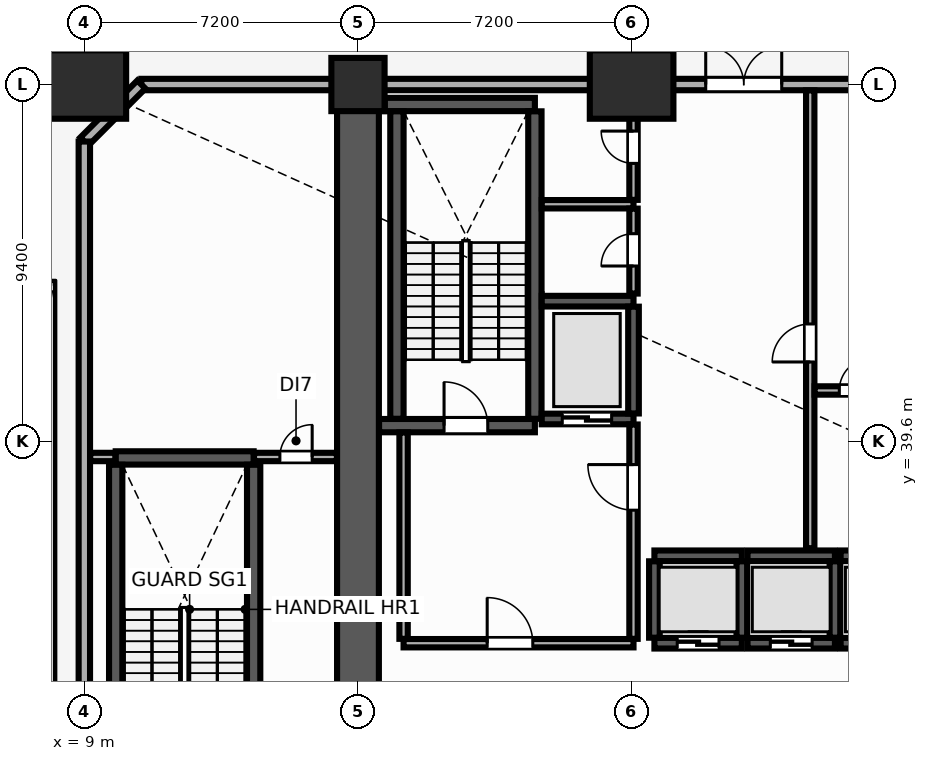
"""IFC4 building model, lengths in metres.
Left out: names, types, materials, properties, quantities, classifications, styles, units other than length and angle.
Written with IfcOpenShell. Run it as: python <this file> out.ifc"""

import sys

from ifc_helpers import new_model, si_unit, direction, frame, frame_2d, origin, origin_2d, place, context, subcontext, project, spatial, rectangle, extrude, element, fill, save


model = new_model("IFC4")
c1 = context("Model", 3, precision=1e-05, world=origin(), true_north=direction((0.0, 1.0)))
c2 = subcontext(c1, "Body", "Model", "MODEL_VIEW")
j1 = project(units=[si_unit("LENGTHUNIT", "METRE"), si_unit("PLANEANGLEUNIT", "RADIAN")], contexts=[c1])
p1 = place(None, origin())
s1 = spatial("IfcSite", under=j1, at=p1, CompositionType="ELEMENT")
p2 = place(p1, origin())
s2 = spatial("IfcBuilding", under=s1, at=p2, CompositionType="ELEMENT")
p3 = place(p2, origin())
s3 = spatial("IfcBuildingStorey", under=s2, at=p3, CompositionType="ELEMENT", Elevation=0.0)
for number, where, z_axis, x_axis in (
    (1, (9.0, 49.0, 0.0), (0.0, 0.0, 1.0), (1.0, 0.0, 0.0)),
    (2, (23.4, 49.0, 0.0), (0.0, 0.0, 1.0), (1.0, 0.0, 0.0)),
):
    element("IfcColumn", number, at=place(p3, frame(where, z_axis=z_axis, x_axis=x_axis)), inside=s3, PredefinedType="USERDEFINED", context=c2, shape_type="SweptSolid", body=[
        extrude(rectangle(XDim=2.2, YDim=1.8, at=origin_2d()), origin(), (0.0, 0.0, 1.0), 7.68),
    ])
p4 = place(p3, frame((16.2, 49.0, 0.0), z_axis=(0.0, 0.0, 1.0), x_axis=(1.0, 0.0, 0.0)))
e3 = element("IfcColumn", 3, at=p4, inside=s3, PredefinedType="COLUMN", context=c2, shape_type="SweptSolid", body=[
    extrude(rectangle(XDim=1.4, YDim=1.4, at=origin_2d()), origin(), (0.0, 0.0, 1.0), 7.68),
])
p5 = place(p3, frame((73.5, 49.0, 0.0), z_axis=(0.0, 0.0, 1.0), x_axis=(-1.0, 0.0, 0.0)))
e4 = element("IfcWall", 4, at=p5, inside=s3, PredefinedType="SOLIDWALL", context=c2, shape_type="SweptSolid", body=[
    extrude(rectangle(XDim=63.0, YDim=0.3, at=frame_2d((31.5, 0.0))), origin(), (0.0, 0.0, 1.0), 5.4),
])
p6 = place(p5, frame((46.15, 0.0, 0.0)))
e5 = element("IfcOpeningElement", 5, at=p6, cuts=e4, PredefinedType="OPENING", context=c2, shape_type="SweptSolid", body=[
    extrude(rectangle(XDim=2.0, YDim=2.4, at=frame_2d((1.0, 1.2))), frame((0.0, 0.16, 0.0), z_axis=(0.0, -1.0, 0.0), x_axis=(1.0, 0.0, 0.0)), (0.0, 0.0, 1.0), 0.32),
])
p7 = place(p5, frame((37.6, 0.0, 0.0)))
e6 = element("IfcOpeningElement", 6, at=p7, cuts=e4, PredefinedType="OPENING", context=c2, shape_type="SweptSolid", body=[
    extrude(rectangle(XDim=2.0, YDim=2.4, at=frame_2d((1.0, 1.2))), frame((0.0, 0.16, 0.0), z_axis=(0.0, -1.0, 0.0), x_axis=(1.0, 0.0, 0.0)), (0.0, 0.0, 1.0), 0.32),
])
p8 = place(p5, frame((16.65, 0.0, 0.0)))
e7 = element("IfcOpeningElement", 7, at=p8, cuts=e4, PredefinedType="OPENING", context=c2, shape_type="SweptSolid", body=[
    extrude(rectangle(XDim=2.0, YDim=2.4, at=frame_2d((1.0, 1.2))), frame((0.0, 0.16, 0.0), z_axis=(0.0, -1.0, 0.0), x_axis=(1.0, 0.0, 0.0)), (0.0, 0.0, 1.0), 0.32),
])
p9 = place(p3, frame((10.5, 49.0, 0.0), z_axis=(0.0, 0.0, 1.0), x_axis=(-0.707106781187, -0.707106781187, 0.0)))
e8 = element("IfcWall", 8, at=p9, inside=s3, PredefinedType="SOLIDWALL", context=c2, shape_type="SweptSolid", body=[
    extrude(rectangle(XDim=2.121, YDim=0.3, at=frame_2d((1.061, 0.0))), origin(), (0.0, 0.0, 1.0), 7.68),
])
p10 = place(p3, frame((9.0, 47.5, 0.0), z_axis=(0.0, 0.0, 1.0), x_axis=(0.0, -1.0, 0.0)))
e9 = element("IfcWall", 9, at=p10, inside=s3, PredefinedType="SOLIDWALL", context=c2, shape_type="SweptSolid", body=[
    extrude(rectangle(XDim=26.8, YDim=0.3, at=frame_2d((13.4, 0.0))), origin(), (0.0, 0.0, 1.0), 5.4),
])
p11 = place(p3, frame((16.2, 29.4, 0.0), z_axis=(0.0, 0.0, 1.0), x_axis=(0.0, 1.0, 0.0)))
e10 = element("IfcWall", 10, at=p11, inside=s3, PredefinedType="SHEAR", context=c2, shape_type="SweptSolid", body=[
    extrude(rectangle(XDim=19.2, YDim=1.1, at=frame_2d((9.6, 0.0))), origin(), (0.0, 0.0, 1.0), 7.68),
])
p12 = place(p3, frame((16.755, 40.025, 0.0), z_axis=(0.0, 0.0, 1.0), x_axis=(1.0, 0.0, 0.0)))
e11 = element("IfcWall", 11, at=p12, inside=s3, PredefinedType="SHEAR", context=c2, shape_type="SweptSolid", body=[
    extrude(rectangle(XDim=4.1, YDim=0.35, at=frame_2d((2.05, 0.0))), origin(), (0.0, 0.0, 1.0), 7.68),
])
p13 = place(p12, frame((1.71, 0.0, 0.0)))
e12 = element("IfcOpeningElement", 12, at=p13, cuts=e11, PredefinedType="OPENING", context=c2, shape_type="SweptSolid", body=[
    extrude(rectangle(XDim=1.15, YDim=2.15, at=frame_2d((0.575, 1.075))), frame((0.0, 0.185, 0.0), z_axis=(0.0, -1.0, 0.0), x_axis=(1.0, 0.0, 0.0)), (0.0, 0.0, 1.0), 0.37),
])
p14 = place(p3, frame((16.905, 48.475, 0.0), z_axis=(0.0, 0.0, 1.0), x_axis=(1.0, 0.0, 0.0)))
e13 = element("IfcWall", 13, at=p14, inside=s3, PredefinedType="SHEAR", context=c2, shape_type="SweptSolid", body=[
    extrude(rectangle(XDim=3.95, YDim=0.35, at=frame_2d((1.975, 0.0))), origin(), (0.0, 0.0, 1.0), 7.68),
])
for number, where, z_axis, x_axis in (
    (14, (17.225, 40.205, 0.0), (0.0, 0.0, 1.0), (0.0, 1.0, 0.0)),
    (15, (20.855, 40.205, 0.0), (0.0, 0.0, 1.0), (0.0, 1.0, 0.0)),
):
    element("IfcWall", number, at=place(p3, frame(where, z_axis=z_axis, x_axis=x_axis)), inside=s3, PredefinedType="SHEAR", context=c2, shape_type="SweptSolid", body=[
        extrude(rectangle(XDim=8.09, YDim=0.35, at=frame_2d((4.045, 0.0))), origin(), (0.0, 0.0, 1.0), 7.68),
    ])
p15 = place(p3, frame((9.825, 39.175, 0.0), z_axis=(0.0, 0.0, 1.0), x_axis=(1.0, 0.0, 0.0)))
e16 = element("IfcWall", 16, at=p15, inside=s3, PredefinedType="SHEAR", context=c2, shape_type="SweptSolid", body=[
    extrude(rectangle(XDim=3.63, YDim=0.35, at=frame_2d((1.815, 0.0))), origin(), (0.0, 0.0, 1.0), 7.68),
])
for number, where, z_axis, x_axis in (
    (17, (9.825, 30.555, 0.0), (0.0, 0.0, 1.0), (0.0, 1.0, 0.0)),
    (18, (13.455, 30.555, 0.0), (0.0, 0.0, 1.0), (0.0, 1.0, 0.0)),
):
    element("IfcWall", number, at=place(p3, frame(where, z_axis=z_axis, x_axis=x_axis)), inside=s3, PredefinedType="SHEAR", context=c2, shape_type="SweptSolid", body=[
        extrude(rectangle(XDim=8.44, YDim=0.35, at=frame_2d((4.22, 0.0))), origin(), (0.0, 0.0, 1.0), 7.68),
    ])
p16 = place(p3, frame((24.0, 34.3, 0.0), z_axis=(0.0, 0.0, 1.0), x_axis=(1.0, 0.0, 0.0)))
e19 = element("IfcWall", 19, at=p16, inside=s3, PredefinedType="SHEAR", context=c2, shape_type="SweptSolid", body=[
    extrude(rectangle(XDim=2.3, YDim=0.28, at=frame_2d((1.15, 0.0))), origin(), (0.0, 0.0, 1.0), 7.68),
])
p17 = place(p16, frame((0.6, 0.0, 0.0)))
e20 = element("IfcOpeningElement", 20, at=p17, cuts=e19, PredefinedType="OPENING", context=c2, shape_type="SweptSolid", body=[
    extrude(rectangle(XDim=1.1, YDim=2.2, at=frame_2d((0.55, 1.1))), frame((0.0, 0.15, 0.0), z_axis=(0.0, -1.0, 0.0), x_axis=(1.0, 0.0, 0.0)), (0.0, 0.0, 1.0), 0.3),
])
p18 = place(p3, frame((24.0, 36.6, 0.0), z_axis=(0.0, 0.0, 1.0), x_axis=(1.0, 0.0, 0.0)))
e21 = element("IfcWall", 21, at=p18, inside=s3, PredefinedType="SHEAR", context=c2, shape_type="SweptSolid", body=[
    extrude(rectangle(XDim=2.3, YDim=0.28, at=frame_2d((1.15, 0.0))), origin(), (0.0, 0.0, 1.0), 7.68),
])
for number, where, z_axis, x_axis in (
    (22, (24.0, 34.445, 0.0), (0.0, 0.0, 1.0), (0.0, 1.0, 0.0)),
    (23, (26.3, 34.445, 0.0), (0.0, 0.0, 1.0), (0.0, 1.0, 0.0)),
):
    element("IfcWall", number, at=place(p3, frame(where, z_axis=z_axis, x_axis=x_axis)), inside=s3, PredefinedType="SHEAR", context=c2, shape_type="SweptSolid", body=[
        extrude(rectangle(XDim=2.01, YDim=0.28, at=frame_2d((1.005, 0.0))), origin(), (0.0, 0.0, 1.0), 7.68),
    ])
p19 = place(p3, frame((26.45, 34.3, 0.0), z_axis=(0.0, 0.0, 1.0), x_axis=(1.0, 0.0, 0.0)))
e24 = element("IfcWall", 24, at=p19, inside=s3, PredefinedType="SHEAR", context=c2, shape_type="SweptSolid", body=[
    extrude(rectangle(XDim=2.3, YDim=0.28, at=frame_2d((1.15, 0.0))), origin(), (0.0, 0.0, 1.0), 7.68),
])
p20 = place(p19, frame((0.6, 0.0, 0.0)))
e25 = element("IfcOpeningElement", 25, at=p20, cuts=e24, PredefinedType="OPENING", context=c2, shape_type="SweptSolid", body=[
    extrude(rectangle(XDim=1.1, YDim=2.2, at=frame_2d((0.55, 1.1))), frame((0.0, 0.15, 0.0), z_axis=(0.0, -1.0, 0.0), x_axis=(1.0, 0.0, 0.0)), (0.0, 0.0, 1.0), 0.3),
])
p21 = place(p3, frame((26.45, 36.6, 0.0), z_axis=(0.0, 0.0, 1.0), x_axis=(1.0, 0.0, 0.0)))
e26 = element("IfcWall", 26, at=p21, inside=s3, PredefinedType="SHEAR", context=c2, shape_type="SweptSolid", body=[
    extrude(rectangle(XDim=2.3, YDim=0.28, at=frame_2d((1.15, 0.0))), origin(), (0.0, 0.0, 1.0), 7.68),
])
p22 = place(p3, frame((28.75, 34.445, 0.0), z_axis=(0.0, 0.0, 1.0), x_axis=(0.0, 1.0, 0.0)))
e27 = element("IfcWall", 27, at=p22, inside=s3, PredefinedType="SHEAR", context=c2, shape_type="SweptSolid", body=[
    extrude(rectangle(XDim=2.01, YDim=0.28, at=frame_2d((1.005, 0.0))), origin(), (0.0, 0.0, 1.0), 7.68),
])
p23 = place(p3, frame((28.9, 34.3, 0.0), z_axis=(0.0, 0.0, 1.0), x_axis=(1.0, 0.0, 0.0)))
e28 = element("IfcWall", 28, at=p23, inside=s3, PredefinedType="SHEAR", context=c2, shape_type="SweptSolid", body=[
    extrude(rectangle(XDim=2.3, YDim=0.28, at=frame_2d((1.15, 0.0))), origin(), (0.0, 0.0, 1.0), 7.68),
])
p24 = place(p23, frame((0.6, 0.0, 0.0)))
e29 = element("IfcOpeningElement", 29, at=p24, cuts=e28, PredefinedType="OPENING", context=c2, shape_type="SweptSolid", body=[
    extrude(rectangle(XDim=1.1, YDim=2.2, at=frame_2d((0.55, 1.1))), frame((0.0, 0.15, 0.0), z_axis=(0.0, -1.0, 0.0), x_axis=(1.0, 0.0, 0.0)), (0.0, 0.0, 1.0), 0.3),
])
p25 = place(p3, frame((28.9, 36.6, 0.0), z_axis=(0.0, 0.0, 1.0), x_axis=(1.0, 0.0, 0.0)))
e30 = element("IfcWall", 30, at=p25, inside=s3, PredefinedType="SHEAR", context=c2, shape_type="SweptSolid", body=[
    extrude(rectangle(XDim=2.3, YDim=0.28, at=frame_2d((1.15, 0.0))), origin(), (0.0, 0.0, 1.0), 7.68),
])
p26 = place(p3, frame((21.035, 40.2, 0.0), z_axis=(0.0, 0.0, 1.0), x_axis=(1.0, 0.0, 0.0)))
e31 = element("IfcWall", 31, at=p26, inside=s3, PredefinedType="SHEAR", context=c2, shape_type="SweptSolid", body=[
    extrude(rectangle(XDim=2.415, YDim=0.28, at=frame_2d((1.208, 0.0))), origin(), (0.0, 0.0, 1.0), 7.68),
])
p27 = place(p26, frame((0.54, 0.0, 0.0)))
e32 = element("IfcOpeningElement", 32, at=p27, cuts=e31, PredefinedType="OPENING", context=c2, shape_type="SweptSolid", body=[
    extrude(rectangle(XDim=1.3, YDim=2.3, at=frame_2d((0.65, 1.15))), frame((0.0, 0.15, 0.0), z_axis=(0.0, -1.0, 0.0), x_axis=(1.0, 0.0, 0.0)), (0.0, 0.0, 1.0), 0.3),
])
p28 = place(p3, frame((21.035, 43.3, 0.0), z_axis=(0.0, 0.0, 1.0), x_axis=(1.0, 0.0, 0.0)))
e33 = element("IfcWall", 33, at=p28, inside=s3, PredefinedType="SHEAR", context=c2, shape_type="SweptSolid", body=[
    extrude(rectangle(XDim=2.415, YDim=0.28, at=frame_2d((1.208, 0.0))), origin(), (0.0, 0.0, 1.0), 7.68),
])
p29 = place(p3, frame((23.45, 40.345, 0.0), z_axis=(0.0, 0.0, 1.0), x_axis=(0.0, 1.0, 0.0)))
e34 = element("IfcWall", 34, at=p29, inside=s3, PredefinedType="SHEAR", context=c2, shape_type="SweptSolid", body=[
    extrude(rectangle(XDim=2.81, YDim=0.28, at=frame_2d((1.405, 0.0))), origin(), (0.0, 0.0, 1.0), 7.68),
])
p30 = place(p3, frame((17.4, 34.3, 0.0), z_axis=(0.0, 0.0, 1.0), x_axis=(1.0, 0.0, 0.0)))
e35 = element("IfcWall", 35, at=p30, inside=s3, PredefinedType="PARTITIONING", context=c2, shape_type="SweptSolid", body=[
    extrude(rectangle(XDim=6.05, YDim=0.22, at=frame_2d((3.025, 0.0))), origin(), (0.0, 0.0, 1.0), 7.68),
])
p31 = place(p30, frame((2.2, 0.0, 0.0)))
e36 = element("IfcOpeningElement", 36, at=p31, cuts=e35, PredefinedType="OPENING", context=c2, shape_type="SweptSolid", body=[
    extrude(rectangle(XDim=1.2, YDim=2.15, at=frame_2d((0.6, 1.075))), frame((0.0, 0.12, 0.0), z_axis=(0.0, -1.0, 0.0), x_axis=(1.0, 0.0, 0.0)), (0.0, 0.0, 1.0), 0.24),
])
p32 = place(p3, frame((17.4, 34.415, 0.0), z_axis=(0.0, 0.0, 1.0), x_axis=(0.0, 1.0, 0.0)))
e37 = element("IfcWall", 37, at=p32, inside=s3, PredefinedType="PARTITIONING", context=c2, shape_type="SweptSolid", body=[
    extrude(rectangle(XDim=5.43, YDim=0.22, at=frame_2d((2.715, 0.0))), origin(), (0.0, 0.0, 1.0), 7.68),
])
p33 = place(p3, frame((23.45, 34.415, 0.0), z_axis=(0.0, 0.0, 1.0), x_axis=(0.0, 1.0, 0.0)))
e38 = element("IfcWall", 38, at=p33, inside=s3, PredefinedType="PARTITIONING", context=c2, shape_type="SweptSolid", body=[
    extrude(rectangle(XDim=5.64, YDim=0.22, at=frame_2d((2.82, 0.0))), origin(), (0.0, 0.0, 1.0), 7.68),
])
p34 = place(p33, frame((3.385, 0.0, 0.0)))
e39 = element("IfcOpeningElement", 39, at=p34, cuts=e38, PredefinedType="OPENING", context=c2, shape_type="SweptSolid", body=[
    extrude(rectangle(XDim=1.2, YDim=2.15, at=frame_2d((0.6, 1.075))), frame((0.0, 0.12, 0.0), z_axis=(0.0, -1.0, 0.0), x_axis=(1.0, 0.0, 0.0)), (0.0, 0.0, 1.0), 0.24),
])
p35 = place(p3, frame((21.035, 45.85, 0.0), z_axis=(0.0, 0.0, 1.0), x_axis=(1.0, 0.0, 0.0)))
e40 = element("IfcWall", 40, at=p35, inside=s3, PredefinedType="PARTITIONING", context=c2, shape_type="SweptSolid", body=[
    extrude(rectangle(XDim=2.415, YDim=0.22, at=frame_2d((1.208, 0.0))), origin(), (0.0, 0.0, 1.0), 7.68),
])
p36 = place(p3, frame((23.45, 43.5, 0.0), z_axis=(0.0, 0.0, 1.0), x_axis=(0.0, 1.0, 0.0)))
e41 = element("IfcWall", 41, at=p36, inside=s3, PredefinedType="PARTITIONING", context=c2, shape_type="SweptSolid", body=[
    extrude(rectangle(XDim=2.235, YDim=0.22, at=frame_2d((1.118, 0.0))), origin(), (0.0, 0.0, 1.0), 7.68),
])
p37 = place(p36, frame((0.725, 0.0, 0.0)))
e42 = element("IfcOpeningElement", 42, at=p37, cuts=e41, PredefinedType="OPENING", context=c2, shape_type="SweptSolid", body=[
    extrude(rectangle(XDim=0.85, YDim=2.1, at=frame_2d((0.425, 1.05))), frame((0.0, 0.12, 0.0), z_axis=(0.0, -1.0, 0.0), x_axis=(1.0, 0.0, 0.0)), (0.0, 0.0, 1.0), 0.24),
])
p38 = place(p3, frame((23.45, 45.965, 0.0), z_axis=(0.0, 0.0, 1.0), x_axis=(0.0, 1.0, 0.0)))
e43 = element("IfcWall", 43, at=p38, inside=s3, PredefinedType="PARTITIONING", context=c2, shape_type="SweptSolid", body=[
    extrude(rectangle(XDim=2.88, YDim=0.22, at=frame_2d((1.44, 0.0))), origin(), (0.0, 0.0, 1.0), 7.68),
])
p39 = place(p38, frame((0.96, 0.0, 0.0)))
e44 = element("IfcOpeningElement", 44, at=p39, cuts=e43, PredefinedType="OPENING", context=c2, shape_type="SweptSolid", body=[
    extrude(rectangle(XDim=0.85, YDim=2.1, at=frame_2d((0.425, 1.05))), frame((0.0, 0.12, 0.0), z_axis=(0.0, -1.0, 0.0), x_axis=(1.0, 0.0, 0.0)), (0.0, 0.0, 1.0), 0.24),
])
p40 = place(p3, frame((28.1, 36.8, 0.0), z_axis=(0.0, 0.0, 1.0), x_axis=(0.0, 1.0, 0.0)))
e45 = element("IfcWall", 45, at=p40, inside=s3, PredefinedType="PARTITIONING", context=c2, shape_type="SweptSolid", body=[
    extrude(rectangle(XDim=12.045, YDim=0.22, at=frame_2d((6.022, 0.0))), origin(), (0.0, 0.0, 1.0), 7.68),
])
p41 = place(p40, frame((4.9, 0.0, 0.0)))
e46 = element("IfcOpeningElement", 46, at=p41, cuts=e45, PredefinedType="OPENING", context=c2, shape_type="SweptSolid", body=[
    extrude(rectangle(XDim=1.0, YDim=2.15, at=frame_2d((0.5, 1.075))), frame((0.0, 0.12, 0.0), z_axis=(0.0, -1.0, 0.0), x_axis=(1.0, 0.0, 0.0)), (0.0, 0.0, 1.0), 0.24),
])
p42 = place(p3, frame((28.215, 40.95, 0.0), z_axis=(0.0, 0.0, 1.0), x_axis=(1.0, 0.0, 0.0)))
e47 = element("IfcWall", 47, at=p42, inside=s3, PredefinedType="PARTITIONING", context=c2, shape_type="SweptSolid", body=[
    extrude(rectangle(XDim=2.385, YDim=0.22, at=frame_2d((1.192, 0.0))), origin(), (0.0, 0.0, 1.0), 7.68),
])
p43 = place(p42, frame((0.65, 0.0, 0.0)))
e48 = element("IfcOpeningElement", 48, at=p43, cuts=e47, PredefinedType="OPENING", context=c2, shape_type="SweptSolid", body=[
    extrude(rectangle(XDim=0.85, YDim=2.1, at=frame_2d((0.425, 1.05))), frame((0.0, 0.12, 0.0), z_axis=(0.0, -1.0, 0.0), x_axis=(1.0, 0.0, 0.0)), (0.0, 0.0, 1.0), 0.24),
])
p44 = place(p3, frame((9.155, 39.2, 0.0), z_axis=(0.0, 0.0, 1.0), x_axis=(1.0, 0.0, 0.0)))
e49 = element("IfcWall", 49, at=p44, inside=s3, PredefinedType="PARTITIONING", context=c2, shape_type="SweptSolid", body=[
    extrude(rectangle(XDim=0.66, YDim=0.22, at=frame_2d((0.33, 0.0))), origin(), (0.0, 0.0, 1.0), 7.68),
])
p45 = place(p3, frame((13.465, 39.2, 0.0), z_axis=(0.0, 0.0, 1.0), x_axis=(1.0, 0.0, 0.0)))
e50 = element("IfcWall", 50, at=p45, inside=s3, PredefinedType="PARTITIONING", context=c2, shape_type="SweptSolid", body=[
    extrude(rectangle(XDim=2.18, YDim=0.22, at=frame_2d((1.09, 0.0))), origin(), (0.0, 0.0, 1.0), 7.68),
])
p46 = place(p45, frame((0.68, 0.0, 0.0)))
e51 = element("IfcOpeningElement", 51, at=p46, cuts=e50, PredefinedType="OPENING", context=c2, shape_type="SweptSolid", body=[
    extrude(rectangle(XDim=0.85, YDim=2.1, at=frame_2d((0.425, 1.05))), frame((0.0, 0.12, 0.0), z_axis=(0.0, -1.0, 0.0), x_axis=(1.0, 0.0, 0.0)), (0.0, 0.0, 1.0), 0.24),
])
p47 = place(p13, origin())
e52 = element("IfcDoor", 52, at=p47, inside=s3, OperationType="SINGLE_SWING_LEFT", PredefinedType="DOOR", context=c2, shape_type="SweptSolid", body=[
    extrude(rectangle(XDim=1.15, YDim=2.15, at=frame_2d((0.575, 1.075))), frame((0.0, 0.025, 0.0), z_axis=(0.0, -1.0, 0.0), x_axis=(1.0, 0.0, 0.0)), (0.0, 0.0, 1.0), 0.05),
])
fill(e12, e52)
p48 = place(p17, origin())
e53 = element("IfcDoor", 53, at=p48, inside=s3, OperationType="DOUBLE_DOOR_SLIDING", PredefinedType="DOOR", context=c2, shape_type="SweptSolid", body=[
    extrude(rectangle(XDim=1.1, YDim=2.2, at=frame_2d((0.55, 1.1))), frame((0.0, 0.025, 0.0), z_axis=(0.0, -1.0, 0.0), x_axis=(1.0, 0.0, 0.0)), (0.0, 0.0, 1.0), 0.05),
])
fill(e20, e53)
p49 = place(p20, origin())
e54 = element("IfcDoor", 54, at=p49, inside=s3, OperationType="DOUBLE_DOOR_SLIDING", PredefinedType="DOOR", context=c2, shape_type="SweptSolid", body=[
    extrude(rectangle(XDim=1.1, YDim=2.2, at=frame_2d((0.55, 1.1))), frame((0.0, 0.025, 0.0), z_axis=(0.0, -1.0, 0.0), x_axis=(1.0, 0.0, 0.0)), (0.0, 0.0, 1.0), 0.05),
])
fill(e25, e54)
p50 = place(p27, origin())
e55 = element("IfcDoor", 55, at=p50, inside=s3, OperationType="DOUBLE_DOOR_SLIDING", PredefinedType="DOOR", context=c2, shape_type="SweptSolid", body=[
    extrude(rectangle(XDim=1.3, YDim=2.3, at=frame_2d((0.65, 1.15))), frame((0.0, 0.025, 0.0), z_axis=(0.0, -1.0, 0.0), x_axis=(1.0, 0.0, 0.0)), (0.0, 0.0, 1.0), 0.05),
])
fill(e32, e55)
p51 = place(p31, origin())
e56 = element("IfcDoor", 56, at=p51, inside=s3, OperationType="SINGLE_SWING_LEFT", PredefinedType="DOOR", context=c2, shape_type="SweptSolid", body=[
    extrude(rectangle(XDim=1.2, YDim=2.15, at=frame_2d((0.6, 1.075))), frame((0.0, 0.025, 0.0), z_axis=(0.0, -1.0, 0.0), x_axis=(1.0, 0.0, 0.0)), (0.0, 0.0, 1.0), 0.05),
])
fill(e36, e56)
p52 = place(p37, origin())
e57 = element("IfcDoor", 57, at=p52, inside=s3, OperationType="SINGLE_SWING_LEFT", PredefinedType="DOOR", context=c2, shape_type="SweptSolid", body=[
    extrude(rectangle(XDim=0.85, YDim=2.1, at=frame_2d((0.425, 1.05))), frame((0.0, 0.025, 0.0), z_axis=(0.0, -1.0, 0.0), x_axis=(1.0, 0.0, 0.0)), (0.0, 0.0, 1.0), 0.05),
])
fill(e42, e57)
p53 = place(p39, origin())
e58 = element("IfcDoor", 58, at=p53, inside=s3, OperationType="SINGLE_SWING_RIGHT", PredefinedType="DOOR", context=c2, shape_type="SweptSolid", body=[
    extrude(rectangle(XDim=0.85, YDim=2.1, at=frame_2d((0.425, 1.05))), frame((0.0, 0.025, 0.0), z_axis=(0.0, -1.0, 0.0), x_axis=(1.0, 0.0, 0.0)), (0.0, 0.0, 1.0), 0.05),
])
fill(e44, e58)
p54 = place(p41, origin())
e59 = element("IfcDoor", 59, at=p54, inside=s3, OperationType="SINGLE_SWING_LEFT", PredefinedType="DOOR", context=c2, shape_type="SweptSolid", body=[
    extrude(rectangle(XDim=1.0, YDim=2.15, at=frame_2d((0.5, 1.075))), frame((0.0, 0.025, 0.0), z_axis=(0.0, -1.0, 0.0), x_axis=(1.0, 0.0, 0.0)), (0.0, 0.0, 1.0), 0.05),
])
fill(e46, e59)
p55 = place(p43, origin())
e60 = element("IfcDoor", 60, at=p55, inside=s3, OperationType="SINGLE_SWING_RIGHT", PredefinedType="DOOR", context=c2, shape_type="SweptSolid", body=[
    extrude(rectangle(XDim=0.85, YDim=2.1, at=frame_2d((0.425, 1.05))), frame((0.0, 0.025, 0.0), z_axis=(0.0, -1.0, 0.0), x_axis=(1.0, 0.0, 0.0)), (0.0, 0.0, 1.0), 0.05),
])
fill(e48, e60)
p56 = place(p46, origin())
e61 = element("IfcDoor", 61, at=p56, inside=s3, OperationType="SINGLE_SWING_RIGHT", PredefinedType="DOOR", context=c2, shape_type="SweptSolid", body=[
    extrude(rectangle(XDim=0.85, YDim=2.1, at=frame_2d((0.425, 1.05))), frame((0.0, 0.025, 0.0), z_axis=(0.0, -1.0, 0.0), x_axis=(1.0, 0.0, 0.0)), (0.0, 0.0, 1.0), 0.05),
])
fill(e51, e61)
p57 = place(p34, origin())
e62 = element("IfcDoor", 62, at=p57, inside=s3, OperationType="SINGLE_SWING_RIGHT", PredefinedType="DOOR", context=c2, shape_type="SweptSolid", body=[
    extrude(rectangle(XDim=1.2, YDim=2.15, at=frame_2d((0.6, 1.075))), frame((0.0, 0.025, 0.0), z_axis=(0.0, -1.0, 0.0), x_axis=(1.0, 0.0, 0.0)), (0.0, 0.0, 1.0), 0.05),
])
fill(e39, e62)
p58 = place(p6, frame((2.0, 0.0, 0.0), z_axis=(0.0, 0.0, 1.0), x_axis=(-1.0, 0.0, 0.0)))
e63 = element("IfcDoor", 63, at=p58, inside=s3, OperationType="DOUBLE_DOOR_SINGLE_SWING", PredefinedType="DOOR", context=c2, shape_type="SweptSolid", body=[
    extrude(rectangle(XDim=2.0, YDim=2.4, at=frame_2d((1.0, 1.2))), frame((0.0, 0.025, 0.0), z_axis=(0.0, -1.0, 0.0), x_axis=(1.0, 0.0, 0.0)), (0.0, 0.0, 1.0), 0.05),
])
fill(e5, e63)
save(model, sys.argv[1])
